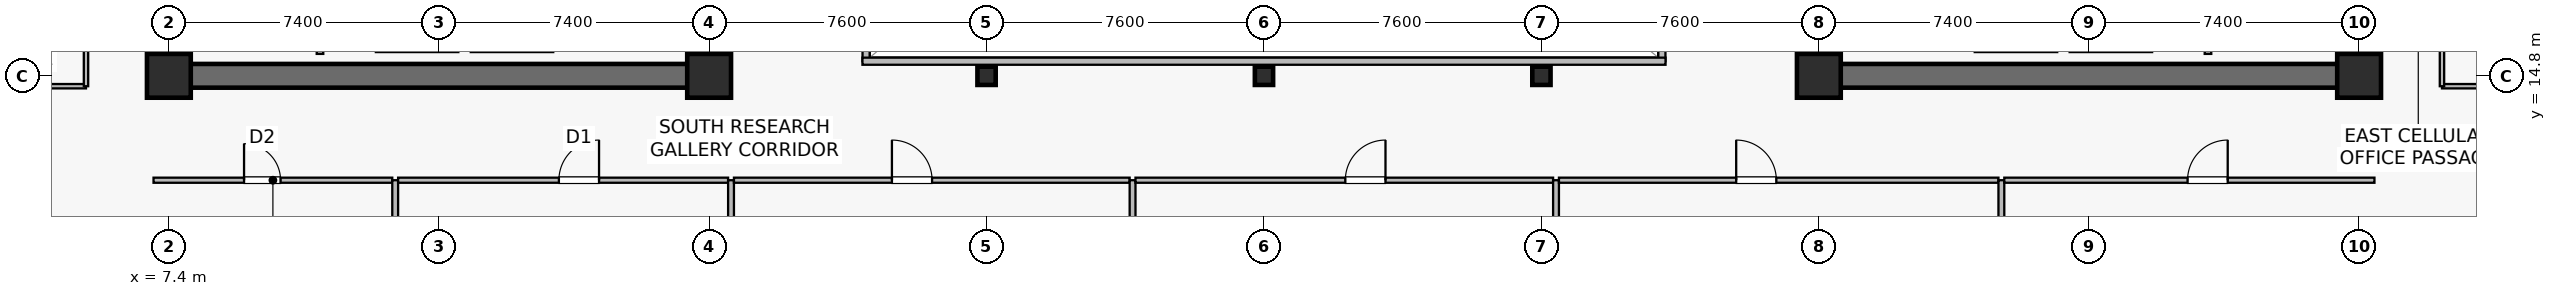
"""IFC4 building model, lengths in metres.
Left out: names, types, materials, properties, quantities, classifications, styles, units other than length and angle.
Written with IfcOpenShell. Run it as: python <this file> out.ifc"""

import sys

from ifc_helpers import new_model, si_unit, direction, frame, frame_2d, origin, origin_2d, place, context, subcontext, project, spatial, rectangle, hollow_rectangle, extrude, source, transform, mapped, element, fill, save


model = new_model("IFC4")
c1 = context("Model", 3, precision=1e-05, world=origin(), true_north=direction((0.0, 1.0)))
c2 = subcontext(c1, "Body", "Model", "MODEL_VIEW")
j1 = project(units=[si_unit("LENGTHUNIT", "METRE"), si_unit("PLANEANGLEUNIT", "RADIAN")], contexts=[c1])
p1 = place(None, origin())
s1 = spatial("IfcSite", under=j1, at=p1, CompositionType="ELEMENT")
p2 = place(p1, origin())
s2 = spatial("IfcBuilding", under=s1, at=p2, CompositionType="ELEMENT")
p3 = place(p2, frame((0.0, 0.0, 158.4)))
s3 = spatial("IfcBuildingStorey", under=s2, at=p3, CompositionType="ELEMENT", Elevation=158.4)
p4 = place(p3, frame((7.075, 14.8, 0.0), z_axis=(0.0, 0.0, 1.0), x_axis=(1.0, 0.0, 0.0)))
e1 = element("IfcWall", 1, at=p4, inside=s3, PredefinedType="SHEAR", context=c2, shape_type="SweptSolid", body=[
    extrude(rectangle(XDim=15.45, YDim=0.65, at=frame_2d((7.725, 0.0))), origin(), (0.0, 0.0, 1.0), 3.79),
])
p5 = place(p3, frame((7.4, 15.125, 0.0), z_axis=(0.0, 0.0, 1.0), x_axis=(0.0, 1.0, 0.0)))
e2 = element("IfcWall", 2, at=p5, inside=s3, PredefinedType="SHEAR", context=c2, shape_type="SweptSolid", body=[
    extrude(rectangle(XDim=18.35, YDim=0.65, at=frame_2d((9.175, 0.0))), origin(), (0.0, 0.0, 1.0), 3.79),
])
p6 = place(p3, frame((22.2, 15.125, 0.0), z_axis=(0.0, 0.0, 1.0), x_axis=(0.0, 1.0, 0.0)))
e3 = element("IfcWall", 3, at=p6, inside=s3, PredefinedType="SHEAR", context=c2, shape_type="SweptSolid", body=[
    extrude(rectangle(XDim=18.35, YDim=0.65, at=frame_2d((9.175, 0.0))), origin(), (0.0, 0.0, 1.0), 3.79),
])
p7 = place(p6, frame((3.425, 0.0, 0.0)))
e4 = element("IfcOpeningElement", 4, at=p7, cuts=e3, PredefinedType="OPENING", context=c2, shape_type="SweptSolid", body=[
    extrude(rectangle(XDim=1.42, YDim=2.2, at=frame_2d((0.71, 1.1))), frame((0.0, 0.335, 0.0), z_axis=(0.0, -1.0, 0.0), x_axis=(1.0, 0.0, 0.0)), (0.0, 0.0, 1.0), 0.67),
])
p8 = place(p3, frame((52.275, 14.8, 0.0), z_axis=(0.0, 0.0, 1.0), x_axis=(1.0, 0.0, 0.0)))
e5 = element("IfcWall", 5, at=p8, inside=s3, PredefinedType="SHEAR", context=c2, shape_type="SweptSolid", body=[
    extrude(rectangle(XDim=15.45, YDim=0.65, at=frame_2d((7.725, 0.0))), origin(), (0.0, 0.0, 1.0), 3.79),
])
p9 = place(p3, frame((52.6, 15.125, 0.0), z_axis=(0.0, 0.0, 1.0), x_axis=(0.0, 1.0, 0.0)))
e6 = element("IfcWall", 6, at=p9, inside=s3, PredefinedType="SHEAR", context=c2, shape_type="SweptSolid", body=[
    extrude(rectangle(XDim=18.35, YDim=0.65, at=frame_2d((9.175, 0.0))), origin(), (0.0, 0.0, 1.0), 3.79),
])
p10 = place(p9, frame((3.425, 0.0, 0.0)))
e7 = element("IfcOpeningElement", 7, at=p10, cuts=e6, PredefinedType="OPENING", context=c2, shape_type="SweptSolid", body=[
    extrude(rectangle(XDim=1.42, YDim=2.2, at=frame_2d((0.71, 1.1))), frame((0.0, 0.335, 0.0), z_axis=(0.0, -1.0, 0.0), x_axis=(1.0, 0.0, 0.0)), (0.0, 0.0, 1.0), 0.67),
])
p11 = place(p3, frame((67.4, 15.125, 0.0), z_axis=(0.0, 0.0, 1.0), x_axis=(0.0, 1.0, 0.0)))
e8 = element("IfcWall", 8, at=p11, inside=s3, PredefinedType="SHEAR", context=c2, shape_type="SweptSolid", body=[
    extrude(rectangle(XDim=18.35, YDim=0.65, at=frame_2d((9.175, 0.0))), origin(), (0.0, 0.0, 1.0), 3.79),
])
m1 = source(origin(), c2, "Body", "SweptSolid", [
    extrude(rectangle(XDim=1.2, YDim=1.2, at=origin_2d()), origin(), (0.0, 0.0, 1.0), 4.1),
])
for number, where, z_axis, x_axis in (
    (9, (7.4, 14.8, 0.0), (0.0, 0.0, 1.0), (1.0, 0.0, 0.0)),
    (10, (22.2, 14.8, 0.0), (0.0, 0.0, 1.0), (1.0, 0.0, 0.0)),
    (11, (52.6, 14.8, 0.0), (0.0, 0.0, 1.0), (1.0, 0.0, 0.0)),
    (12, (67.4, 14.8, 0.0), (0.0, 0.0, 1.0), (1.0, 0.0, 0.0)),
):
    element("IfcColumn", number, at=place(p3, frame(where, z_axis=z_axis, x_axis=x_axis)), inside=s3, PredefinedType="COLUMN", context=c2, shape_type="MappedRepresentation", body=[
        mapped(m1, transform((0.0, 0.0, 0.0), scale=1.0)),
    ])
m2 = source(origin(), c2, "Body", "SweptSolid", [
    extrude(hollow_rectangle(XDim=0.5, YDim=0.5, WallThickness=0.022, at=origin_2d()), origin(), (0.0, 0.0, 1.0), 4.1),
])
for number, where, z_axis, x_axis in (
    (13, (29.8, 14.8, 0.0), (0.0, 0.0, 1.0), (1.0, 0.0, 0.0)),
    (14, (37.4, 14.8, 0.0), (0.0, 0.0, 1.0), (1.0, 0.0, 0.0)),
    (15, (45.0, 14.8, 0.0), (0.0, 0.0, 1.0), (1.0, 0.0, 0.0)),
):
    element("IfcColumn", number, at=place(p3, frame(where, z_axis=z_axis, x_axis=x_axis)), inside=s3, PredefinedType="COLUMN", context=c2, shape_type="MappedRepresentation", body=[
        mapped(m2, transform((0.0, 0.0, 0.0), scale=1.0)),
    ])
p12 = place(p3, frame((13.07, 15.55, 0.0), z_axis=(0.0, 0.0, 1.0), x_axis=(1.0, 0.0, 0.0)))
e16 = element("IfcWall", 16, at=p12, inside=s3, PredefinedType="SOLIDWALL", context=c2, shape_type="SweptSolid", body=[
    extrude(rectangle(XDim=2.26, YDim=0.2, at=frame_2d((1.13, 0.0))), origin(), (0.0, 0.0, 1.0), 3.187),
])
p13 = place(p3, frame((15.67, 15.55, 0.0), z_axis=(0.0, 0.0, 1.0), x_axis=(1.0, 0.0, 0.0)))
e17 = element("IfcWall", 17, at=p13, inside=s3, PredefinedType="SOLIDWALL", context=c2, shape_type="SweptSolid", body=[
    extrude(rectangle(XDim=2.26, YDim=0.2, at=frame_2d((1.13, 0.0))), origin(), (0.0, 0.0, 1.0), 3.79),
])
p14 = place(p3, frame((11.54, 15.4, 0.0), z_axis=(0.0, 0.0, 1.0), x_axis=(0.0, 1.0, 0.0)))
e18 = element("IfcWall", 18, at=p14, inside=s3, PredefinedType="SOLIDWALL", context=c2, shape_type="SweptSolid", body=[
    extrude(rectangle(XDim=2.4, YDim=0.18, at=frame_2d((1.2, 0.0))), origin(), (0.0, 0.0, 1.0), 3.79),
])
p15 = place(p3, frame((59.47, 15.55, 0.0), z_axis=(0.0, 0.0, 1.0), x_axis=(1.0, 0.0, 0.0)))
e19 = element("IfcWall", 19, at=p15, inside=s3, PredefinedType="SOLIDWALL", context=c2, shape_type="SweptSolid", body=[
    extrude(rectangle(XDim=2.26, YDim=0.2, at=frame_2d((1.13, 0.0))), origin(), (0.0, 0.0, 1.0), 3.187),
])
p16 = place(p3, frame((56.87, 15.55, 0.0), z_axis=(0.0, 0.0, 1.0), x_axis=(1.0, 0.0, 0.0)))
e20 = element("IfcWall", 20, at=p16, inside=s3, PredefinedType="SOLIDWALL", context=c2, shape_type="SweptSolid", body=[
    extrude(rectangle(XDim=2.26, YDim=0.2, at=frame_2d((1.13, 0.0))), origin(), (0.0, 0.0, 1.0), 3.79),
])
p17 = place(p3, frame((63.26, 15.4, 0.0), z_axis=(0.0, 0.0, 1.0), x_axis=(0.0, 1.0, 0.0)))
e21 = element("IfcWall", 21, at=p17, inside=s3, PredefinedType="SOLIDWALL", context=c2, shape_type="SweptSolid", body=[
    extrude(rectangle(XDim=2.4, YDim=0.18, at=frame_2d((1.2, 0.0))), origin(), (0.0, 0.0, 1.0), 3.79),
])
p18 = place(p3, frame((26.5, 15.2, 0.0), z_axis=(0.0, 0.0, 1.0), x_axis=(0.0, 1.0, 0.0)))
e22 = element("IfcWall", 22, at=p18, inside=s3, PredefinedType="SOLIDWALL", context=c2, shape_type="SweptSolid", body=[
    extrude(rectangle(XDim=18.2, YDim=0.195, at=frame_2d((9.1, 0.0))), origin(), (0.0, 0.0, 1.0), 3.79),
])
p19 = place(p18, frame((1.8, 0.0, 0.9)))
e23 = element("IfcOpeningElement", 23, at=p19, cuts=e22, PredefinedType="OPENING", context=c2, shape_type="SweptSolid", body=[
    extrude(rectangle(XDim=1.5, YDim=1.4, at=frame_2d((0.75, 0.7))), frame((0.0, 0.107, 0.0), z_axis=(0.0, -1.0, 0.0), x_axis=(1.0, 0.0, 0.0)), (0.0, 0.0, 1.0), 0.215),
])
p20 = place(p18, frame((13.2, 0.0, 0.9)))
e24 = element("IfcOpeningElement", 24, at=p20, cuts=e22, PredefinedType="OPENING", context=c2, shape_type="SweptSolid", body=[
    extrude(rectangle(XDim=1.5, YDim=1.4, at=frame_2d((0.75, 0.7))), frame((0.0, 0.107, 0.0), z_axis=(0.0, -1.0, 0.0), x_axis=(1.0, 0.0, 0.0)), (0.0, 0.0, 1.0), 0.215),
])
p21 = place(p3, frame((48.3, 15.2, 0.0), z_axis=(0.0, 0.0, 1.0), x_axis=(0.0, 1.0, 0.0)))
e25 = element("IfcWall", 25, at=p21, inside=s3, PredefinedType="SOLIDWALL", context=c2, shape_type="SweptSolid", body=[
    extrude(rectangle(XDim=18.2, YDim=0.195, at=frame_2d((9.1, 0.0))), origin(), (0.0, 0.0, 1.0), 3.79),
])
p22 = place(p21, frame((1.8, 0.0, 0.9)))
e26 = element("IfcOpeningElement", 26, at=p22, cuts=e25, PredefinedType="OPENING", context=c2, shape_type="SweptSolid", body=[
    extrude(rectangle(XDim=1.5, YDim=1.4, at=frame_2d((0.75, 0.7))), frame((0.0, 0.107, 0.0), z_axis=(0.0, -1.0, 0.0), x_axis=(1.0, 0.0, 0.0)), (0.0, 0.0, 1.0), 0.215),
])
p23 = place(p21, frame((13.2, 0.0, 0.9)))
e27 = element("IfcOpeningElement", 27, at=p23, cuts=e25, PredefinedType="OPENING", context=c2, shape_type="SweptSolid", body=[
    extrude(rectangle(XDim=1.5, YDim=1.4, at=frame_2d((0.75, 0.7))), frame((0.0, 0.107, 0.0), z_axis=(0.0, -1.0, 0.0), x_axis=(1.0, 0.0, 0.0)), (0.0, 0.0, 1.0), 0.215),
])
p24 = place(p3, frame((26.4, 15.2, 0.0), z_axis=(0.0, 0.0, 1.0), x_axis=(1.0, 0.0, 0.0)))
e28 = element("IfcWall", 28, at=p24, inside=s3, PredefinedType="SOLIDWALL", context=c2, shape_type="SweptSolid", body=[
    extrude(rectangle(XDim=22.0, YDim=0.195, at=frame_2d((11.0, 0.0))), origin(), (0.0, 0.0, 1.0), 3.79),
])
p25 = place(p3, frame((6.98, 11.94, 0.0), z_axis=(0.0, 0.0, 1.0), x_axis=(1.0, 0.0, 0.0)))
e29 = element("IfcWall", 29, at=p25, inside=s3, PredefinedType="PARTITIONING", context=c2, shape_type="SweptSolid", body=[
    extrude(rectangle(XDim=6.54, YDim=0.14, at=frame_2d((3.27, 0.0))), origin(), (0.0, 0.0, 1.0), 3.275),
])
p26 = place(p25, frame((2.479, 0.0, 0.0)))
e30 = element("IfcOpeningElement", 30, at=p26, cuts=e29, PredefinedType="OPENING", context=c2, shape_type="SweptSolid", body=[
    extrude(rectangle(XDim=1.0, YDim=2.15, at=frame_2d((0.5, 1.075))), frame((0.0, 0.08, 0.0), z_axis=(0.0, -1.0, 0.0), x_axis=(1.0, 0.0, 0.0)), (0.0, 0.0, 1.0), 0.16),
])
p27 = place(p3, frame((13.6, 1.41, 0.0), z_axis=(0.0, 0.0, 1.0), x_axis=(0.0, 1.0, 0.0)))
e31 = element("IfcWall", 31, at=p27, inside=s3, PredefinedType="PARTITIONING", context=c2, shape_type="SweptSolid", body=[
    extrude(rectangle(XDim=10.53, YDim=0.16, at=frame_2d((5.265, 0.0))), origin(), (0.0, 0.0, 1.0), 3.075),
])
p28 = place(p3, frame((13.68, 11.94, 0.0), z_axis=(0.0, 0.0, 1.0), x_axis=(1.0, 0.0, 0.0)))
e32 = element("IfcWall", 32, at=p28, inside=s3, PredefinedType="PARTITIONING", context=c2, shape_type="SweptSolid", body=[
    extrude(rectangle(XDim=9.04, YDim=0.14, at=frame_2d((4.52, 0.0))), origin(), (0.0, 0.0, 1.0), 3.187),
])
p29 = place(p28, frame((4.404, 0.0, 0.0)))
e33 = element("IfcOpeningElement", 33, at=p29, cuts=e32, PredefinedType="OPENING", context=c2, shape_type="SweptSolid", body=[
    extrude(rectangle(XDim=1.1, YDim=2.18, at=frame_2d((0.55, 1.09))), frame((0.0, 0.08, 0.0), z_axis=(0.0, -1.0, 0.0), x_axis=(1.0, 0.0, 0.0)), (0.0, 0.0, 1.0), 0.16),
])
p30 = place(p3, frame((22.8, 1.41, 0.0), z_axis=(0.0, 0.0, 1.0), x_axis=(0.0, 1.0, 0.0)))
e34 = element("IfcWall", 34, at=p30, inside=s3, PredefinedType="PARTITIONING", context=c2, shape_type="SweptSolid", body=[
    extrude(rectangle(XDim=10.53, YDim=0.16, at=frame_2d((5.265, 0.0))), origin(), (0.0, 0.0, 1.0), 3.075),
])
p31 = place(p3, frame((22.88, 11.94, 0.0), z_axis=(0.0, 0.0, 1.0), x_axis=(1.0, 0.0, 0.0)))
e35 = element("IfcWall", 35, at=p31, inside=s3, PredefinedType="PARTITIONING", context=c2, shape_type="SweptSolid", body=[
    extrude(rectangle(XDim=10.84, YDim=0.14, at=frame_2d((5.42, 0.0))), origin(), (0.0, 0.0, 1.0), 3.187),
])
p32 = place(p31, frame((4.328, 0.0, 0.0)))
e36 = element("IfcOpeningElement", 36, at=p32, cuts=e35, PredefinedType="OPENING", context=c2, shape_type="SweptSolid", body=[
    extrude(rectangle(XDim=1.1, YDim=2.18, at=frame_2d((0.55, 1.09))), frame((0.0, 0.08, 0.0), z_axis=(0.0, -1.0, 0.0), x_axis=(1.0, 0.0, 0.0)), (0.0, 0.0, 1.0), 0.16),
])
p33 = place(p3, frame((33.8, 2.61, 0.0), z_axis=(0.0, 0.0, 1.0), x_axis=(0.0, 1.0, 0.0)))
e37 = element("IfcWall", 37, at=p33, inside=s3, PredefinedType="PARTITIONING", context=c2, shape_type="SweptSolid", body=[
    extrude(rectangle(XDim=9.33, YDim=0.16, at=frame_2d((4.665, 0.0))), origin(), (0.0, 0.0, 1.0), 3.075),
])
p34 = place(p3, frame((33.88, 11.94, 0.0), z_axis=(0.0, 0.0, 1.0), x_axis=(1.0, 0.0, 0.0)))
e38 = element("IfcWall", 38, at=p34, inside=s3, PredefinedType="PARTITIONING", context=c2, shape_type="SweptSolid", body=[
    extrude(rectangle(XDim=11.44, YDim=0.14, at=frame_2d((5.72, 0.0))), origin(), (0.0, 0.0, 1.0), 3.187),
])
p35 = place(p34, frame((5.748, 0.0, 0.0)))
e39 = element("IfcOpeningElement", 39, at=p35, cuts=e38, PredefinedType="OPENING", context=c2, shape_type="SweptSolid", body=[
    extrude(rectangle(XDim=1.1, YDim=2.18, at=frame_2d((0.55, 1.09))), frame((0.0, 0.08, 0.0), z_axis=(0.0, -1.0, 0.0), x_axis=(1.0, 0.0, 0.0)), (0.0, 0.0, 1.0), 0.16),
])
p36 = place(p3, frame((45.4, 2.61, 0.0), z_axis=(0.0, 0.0, 1.0), x_axis=(0.0, 1.0, 0.0)))
e40 = element("IfcWall", 40, at=p36, inside=s3, PredefinedType="PARTITIONING", context=c2, shape_type="SweptSolid", body=[
    extrude(rectangle(XDim=9.33, YDim=0.16, at=frame_2d((4.665, 0.0))), origin(), (0.0, 0.0, 1.0), 3.075),
])
p37 = place(p3, frame((45.48, 11.94, 0.0), z_axis=(0.0, 0.0, 1.0), x_axis=(1.0, 0.0, 0.0)))
e41 = element("IfcWall", 41, at=p37, inside=s3, PredefinedType="PARTITIONING", context=c2, shape_type="SweptSolid", body=[
    extrude(rectangle(XDim=12.04, YDim=0.14, at=frame_2d((6.02, 0.0))), origin(), (0.0, 0.0, 1.0), 3.187),
])
p38 = place(p37, frame((4.856, 0.0, 0.0)))
e42 = element("IfcOpeningElement", 42, at=p38, cuts=e41, PredefinedType="OPENING", context=c2, shape_type="SweptSolid", body=[
    extrude(rectangle(XDim=1.1, YDim=2.18, at=frame_2d((0.55, 1.09))), frame((0.0, 0.08, 0.0), z_axis=(0.0, -1.0, 0.0), x_axis=(1.0, 0.0, 0.0)), (0.0, 0.0, 1.0), 0.16),
])
p39 = place(p3, frame((57.6, 1.41, 0.0), z_axis=(0.0, 0.0, 1.0), x_axis=(0.0, 1.0, 0.0)))
e43 = element("IfcWall", 43, at=p39, inside=s3, PredefinedType="PARTITIONING", context=c2, shape_type="SweptSolid", body=[
    extrude(rectangle(XDim=10.53, YDim=0.16, at=frame_2d((5.265, 0.0))), origin(), (0.0, 0.0, 1.0), 3.075),
])
p40 = place(p3, frame((57.68, 11.94, 0.0), z_axis=(0.0, 0.0, 1.0), x_axis=(1.0, 0.0, 0.0)))
e44 = element("IfcWall", 44, at=p40, inside=s3, PredefinedType="PARTITIONING", context=c2, shape_type="SweptSolid", body=[
    extrude(rectangle(XDim=10.14, YDim=0.14, at=frame_2d((5.07, 0.0))), origin(), (0.0, 0.0, 1.0), 3.187),
])
p41 = place(p40, frame((5.021, 0.0, 0.0)))
e45 = element("IfcOpeningElement", 45, at=p41, cuts=e44, PredefinedType="OPENING", context=c2, shape_type="SweptSolid", body=[
    extrude(rectangle(XDim=1.1, YDim=2.18, at=frame_2d((0.55, 1.09))), frame((0.0, 0.08, 0.0), z_axis=(0.0, -1.0, 0.0), x_axis=(1.0, 0.0, 0.0)), (0.0, 0.0, 1.0), 0.16),
])
p42 = place(p3, frame((2.11, 14.515, 0.0), z_axis=(0.0, 0.0, 1.0), x_axis=(1.0, 0.0, 0.0)))
e46 = element("IfcWall", 46, at=p42, inside=s3, PredefinedType="PARTITIONING", context=c2, shape_type="SweptSolid", body=[
    extrude(rectangle(XDim=3.02, YDim=0.12, at=frame_2d((1.51, 0.0))), origin(), (0.0, 0.0, 1.0), 3.79),
])
p43 = place(p3, frame((5.13, 14.515, 0.0), z_axis=(0.0, 0.0, 1.0), x_axis=(0.0, 1.0, 0.0)))
e47 = element("IfcWall", 47, at=p43, inside=s3, PredefinedType="PARTITIONING", context=c2, shape_type="SweptSolid", body=[
    extrude(rectangle(XDim=7.025, YDim=0.12, at=frame_2d((3.513, 0.0))), origin(), (0.0, 0.0, 1.0), 3.79),
])
p44 = place(p43, frame((3.062, 0.0, 0.0)))
e48 = element("IfcOpeningElement", 48, at=p44, cuts=e47, PredefinedType="OPENING", context=c2, shape_type="SweptSolid", body=[
    extrude(rectangle(XDim=0.9, YDim=2.1, at=frame_2d((0.45, 1.05))), frame((0.0, 0.07, 0.0), z_axis=(0.0, -1.0, 0.0), x_axis=(1.0, 0.0, 0.0)), (0.0, 0.0, 1.0), 0.14),
])
p45 = place(p3, frame((69.67, 14.515, 0.0), z_axis=(0.0, 0.0, 1.0), x_axis=(1.0, 0.0, 0.0)))
e49 = element("IfcWall", 49, at=p45, inside=s3, PredefinedType="PARTITIONING", context=c2, shape_type="SweptSolid", body=[
    extrude(rectangle(XDim=3.02, YDim=0.12, at=frame_2d((1.51, 0.0))), origin(), (0.0, 0.0, 1.0), 3.79),
])
p46 = place(p3, frame((69.67, 14.515, 0.0), z_axis=(0.0, 0.0, 1.0), x_axis=(0.0, 1.0, 0.0)))
e50 = element("IfcWall", 50, at=p46, inside=s3, PredefinedType="PARTITIONING", context=c2, shape_type="SweptSolid", body=[
    extrude(rectangle(XDim=9.825, YDim=0.12, at=frame_2d((4.913, 0.0))), origin(), (0.0, 0.0, 1.0), 3.79),
])
p47 = place(p46, frame((4.462, 0.0, 0.0)))
e51 = element("IfcOpeningElement", 51, at=p47, cuts=e50, PredefinedType="OPENING", context=c2, shape_type="SweptSolid", body=[
    extrude(rectangle(XDim=0.9, YDim=2.1, at=frame_2d((0.45, 1.05))), frame((0.0, 0.07, 0.0), z_axis=(0.0, -1.0, 0.0), x_axis=(1.0, 0.0, 0.0)), (0.0, 0.0, 1.0), 0.14),
])
m3 = source(origin(), c2, "Body", "SweptSolid", [
    extrude(rectangle(XDim=1.0, YDim=2.15, at=frame_2d((0.5, 1.075))), frame((0.0, 0.025, 0.0), z_axis=(0.0, -1.0, 0.0), x_axis=(1.0, 0.0, 0.0)), (0.0, 0.0, 1.0), 0.05),
])
p48 = place(p26, origin())
e52 = element("IfcDoor", 52, at=p48, inside=s3, OperationType="SINGLE_SWING_LEFT", PredefinedType="DOOR", context=c2, shape_type="MappedRepresentation", body=[
    mapped(m3, transform((0.0, 0.0, 0.0), scale=1.0)),
])
fill(e30, e52)
m4 = source(origin(), c2, "Body", "SweptSolid", [
    extrude(rectangle(XDim=1.1, YDim=2.18, at=frame_2d((0.55, 1.09))), frame((0.0, 0.025, 0.0), z_axis=(0.0, -1.0, 0.0), x_axis=(1.0, 0.0, 0.0)), (0.0, 0.0, 1.0), 0.05),
])
p49 = place(p29, origin())
e53 = element("IfcDoor", 53, at=p49, inside=s3, OperationType="SINGLE_SWING_RIGHT", PredefinedType="DOOR", context=c2, shape_type="MappedRepresentation", body=[
    mapped(m4, transform((0.0, 0.0, 0.0), scale=1.0)),
])
fill(e33, e53)
p50 = place(p32, origin())
e54 = element("IfcDoor", 54, at=p50, inside=s3, OperationType="SINGLE_SWING_LEFT", PredefinedType="DOOR", context=c2, shape_type="MappedRepresentation", body=[
    mapped(m4, transform((0.0, 0.0, 0.0), scale=1.0)),
])
fill(e36, e54)
p51 = place(p35, origin())
e55 = element("IfcDoor", 55, at=p51, inside=s3, OperationType="SINGLE_SWING_RIGHT", PredefinedType="DOOR", context=c2, shape_type="MappedRepresentation", body=[
    mapped(m4, transform((0.0, 0.0, 0.0), scale=1.0)),
])
fill(e39, e55)
p52 = place(p38, origin())
e56 = element("IfcDoor", 56, at=p52, inside=s3, OperationType="SINGLE_SWING_LEFT", PredefinedType="DOOR", context=c2, shape_type="MappedRepresentation", body=[
    mapped(m4, transform((0.0, 0.0, 0.0), scale=1.0)),
])
fill(e42, e56)
p53 = place(p41, origin())
e57 = element("IfcDoor", 57, at=p53, inside=s3, OperationType="SINGLE_SWING_RIGHT", PredefinedType="DOOR", context=c2, shape_type="MappedRepresentation", body=[
    mapped(m4, transform((0.0, 0.0, 0.0), scale=1.0)),
])
fill(e45, e57)
save(model, sys.argv[1])
